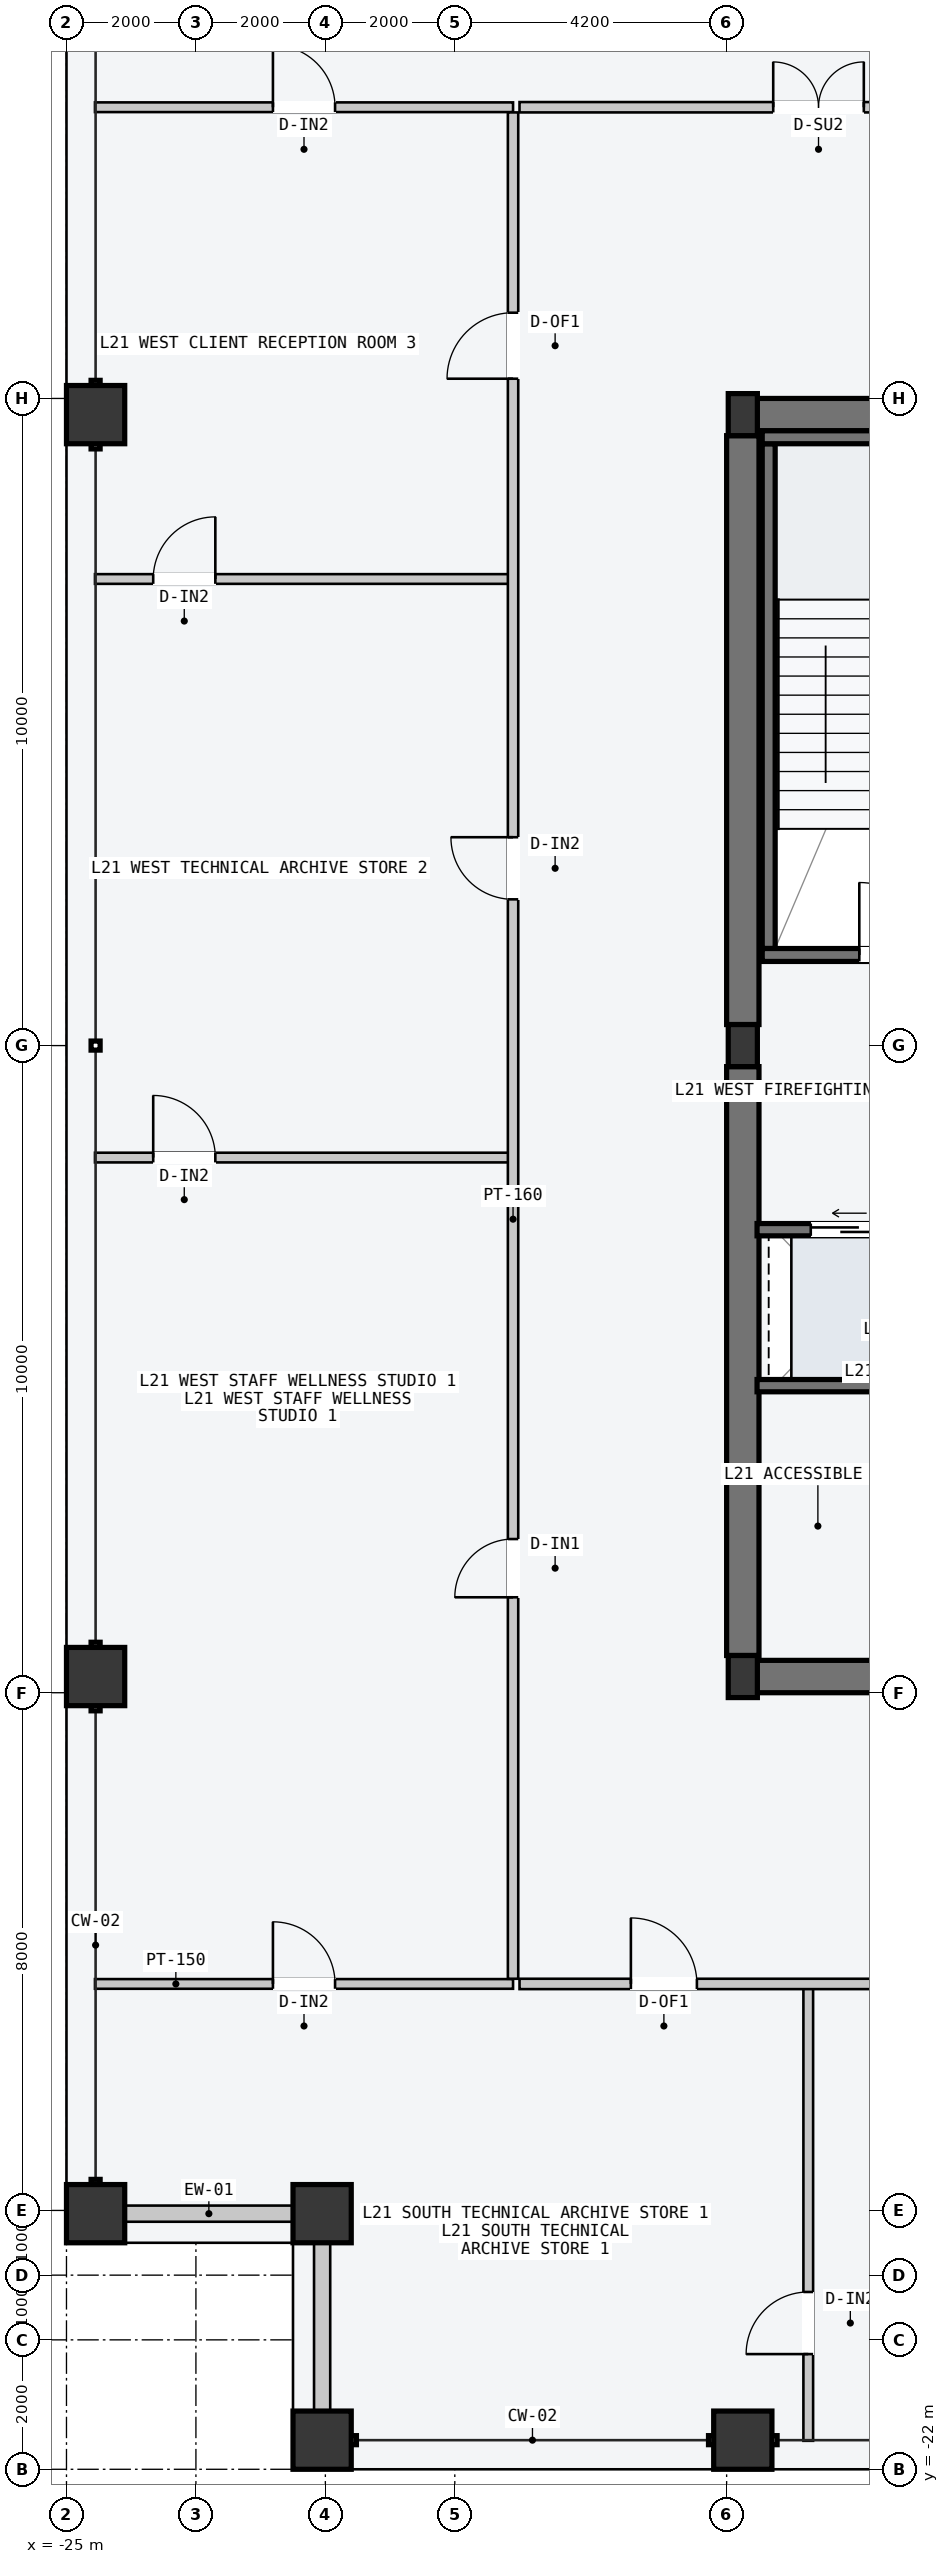
"""IFC4 building model, lengths in metres.
Left out: names, types, materials, properties, quantities, classifications, styles, units other than length and angle.
Written with IfcOpenShell. Run it as: python <this file> out.ifc"""

import sys

from ifc_helpers import new_model, si_unit, direction, frame, frame_2d, origin, origin_2d, place, context, subcontext, project, spatial, rectangle, hollow_rectangle, i_section, extrude, element, fill, save


model = new_model("IFC4")
c1 = context("Model", 3, precision=1e-05, world=origin(), true_north=direction((0.0, 1.0)))
c2 = subcontext(c1, "Body", "Model", "MODEL_VIEW")
j1 = project(units=[si_unit("LENGTHUNIT", "METRE"), si_unit("PLANEANGLEUNIT", "RADIAN")], contexts=[c1])
p1 = place(None, origin())
s1 = spatial("IfcSite", under=j1, at=p1, CompositionType="ELEMENT")
p2 = place(p1, origin())
s2 = spatial("IfcBuilding", under=s1, at=p2, CompositionType="ELEMENT")
p3 = place(p2, frame((0.0, 0.0, 82.8)))
s3 = spatial("IfcBuildingStorey", under=s2, at=p3, CompositionType="ELEMENT", Elevation=82.8)
for number, where, z_axis, x_axis in (
    (1, (-14.53, -9.75, -0.2), (0.0, 0.0, 1.0), (1.0, 0.0, 0.0)),
    (2, (-14.53, 9.75, -0.2), (0.0, 0.0, 1.0), (1.0, 0.0, 0.0)),
):
    element("IfcWall", number, at=place(p3, frame(where, z_axis=z_axis, x_axis=x_axis)), inside=s3, PredefinedType="SHEAR", context=c2, shape_type="SweptSolid", body=[
        extrude(rectangle(XDim=6.46, YDim=0.5, at=frame_2d((3.23, 0.0))), origin(), (0.0, 0.0, 1.0), 4.5),
    ])
for number, where, z_axis, x_axis in (
    (3, (-14.55, -9.425, -0.2), (0.0, 0.0, 1.0), (0.0, 1.0, 0.0)),
    (4, (-14.55, 0.325, -0.2), (0.0, 0.0, 1.0), (0.0, 1.0, 0.0)),
):
    element("IfcWall", number, at=place(p3, frame(where, z_axis=z_axis, x_axis=x_axis)), inside=s3, PredefinedType="SHEAR", context=c2, shape_type="SweptSolid", body=[
        extrude(rectangle(XDim=9.1, YDim=0.5, at=frame_2d((4.55, 0.0))), origin(), (0.0, 0.0, 1.0), 4.5),
    ])
p4 = place(p3, frame((-14.15, 1.5, -0.2), z_axis=(0.0, 0.0, 1.0), x_axis=(0.0, 1.0, 0.0)))
e5 = element("IfcWall", 5, at=p4, inside=s3, PredefinedType="SOLIDWALL", context=c2, shape_type="SweptSolid", body=[
    extrude(rectangle(XDim=7.8, YDim=0.2, at=frame_2d((3.9, 0.0))), origin(), (0.0, 0.0, 1.0), 4.5),
])
p5 = place(p3, frame((-14.25, 1.4, -0.2), z_axis=(0.0, 0.0, 1.0), x_axis=(1.0, 0.0, 0.0)))
e6 = element("IfcWall", 6, at=p5, inside=s3, PredefinedType="SOLIDWALL", context=c2, shape_type="SweptSolid", body=[
    extrude(rectangle(XDim=4.1, YDim=0.2, at=frame_2d((2.05, 0.0))), origin(), (0.0, 0.0, 1.0), 4.5),
])
p6 = place(p5, frame((1.5, 0.0, 0.2)))
e7 = element("IfcOpeningElement", 7, at=p6, cuts=e6, PredefinedType="OPENING", context=c2, shape_type="SweptSolid", body=[
    extrude(rectangle(XDim=1.12, YDim=2.18, at=frame_2d((0.56, 1.09))), frame((0.0, 0.11, 0.0), z_axis=(0.0, -1.0, 0.0), x_axis=(1.0, 0.0, 0.0)), (0.0, 0.0, 1.0), 0.22),
])
p7 = place(p3, frame((-14.25, 9.4, -0.2), z_axis=(0.0, 0.0, 1.0), x_axis=(1.0, 0.0, 0.0)))
e8 = element("IfcWall", 8, at=p7, inside=s3, PredefinedType="SOLIDWALL", context=c2, shape_type="SweptSolid", body=[
    extrude(rectangle(XDim=4.1, YDim=0.2, at=frame_2d((2.05, 0.0))), origin(), (0.0, 0.0, 1.0), 4.5),
])
for number, where, z_axis, x_axis in (
    (9, (-14.55, -9.75, 0.0), (0.0, 0.0, 1.0), (1.0, 0.0, 0.0)),
    (10, (-14.55, 0.0, 0.0), (0.0, 0.0, 1.0), (1.0, 0.0, 0.0)),
    (11, (-14.55, 9.75, 0.0), (0.0, 0.0, 1.0), (1.0, 0.0, 0.0)),
):
    element("IfcColumn", number, at=place(p3, frame(where, z_axis=z_axis, x_axis=x_axis)), inside=s3, PredefinedType="COLUMN", context=c2, shape_type="SweptSolid", body=[
        extrude(i_section(OverallWidth=0.45, OverallDepth=0.65, WebThickness=0.025, FlangeThickness=0.04, at=origin_2d()), origin(), (0.0, 0.0, 1.0), 4.5),
    ])
for number, where, z_axis, x_axis in (
    (12, (-21.05, -21.55, 0.0), (0.0, 0.0, 1.0), (1.0, 0.0, 0.0)),
    (13, (-14.55, -21.55, 0.0), (0.0, 0.0, 1.0), (1.0, 0.0, 0.0)),
    (14, (-24.55, -18.05, 0.0), (0.0, 0.0, 1.0), (0.0, 1.0, 0.0)),
    (15, (-24.55, -9.75, 0.0), (0.0, 0.0, 1.0), (0.0, 1.0, 0.0)),
    (16, (-24.55, 9.75, 0.0), (0.0, 0.0, 1.0), (0.0, 1.0, 0.0)),
    (17, (-21.05, -18.05, 0.0), (0.0, 0.0, 1.0), (1.0, 0.0, 0.0)),
):
    element("IfcColumn", number, at=place(p3, frame(where, z_axis=z_axis, x_axis=x_axis)), inside=s3, PredefinedType="COLUMN", context=c2, shape_type="SweptSolid", body=[
        extrude(hollow_rectangle(XDim=0.9, YDim=0.9, WallThickness=0.045, at=origin_2d()), origin(), (0.0, 0.0, 1.0), 4.5),
    ])
for number, where, z_axis, x_axis in (
    (18, (-24.09, -18.05, 0.0), (0.0, 0.0, 1.0), (1.0, 0.0, 0.0)),
    (19, (-21.05, -21.09, 0.0), (0.0, 0.0, 1.0), (0.0, 1.0, 0.0)),
):
    element("IfcWall", number, at=place(p3, frame(where, z_axis=z_axis, x_axis=x_axis)), inside=s3, PredefinedType="STANDARD", context=c2, shape_type="SweptSolid", body=[
        extrude(rectangle(XDim=2.58, YDim=0.25, at=frame_2d((1.29, 0.0))), origin(), (0.0, 0.0, 1.0), 2.64),
    ])
p8 = place(p3, frame((-14.33, -2.845, -0.2), z_axis=(0.0, 0.0, 1.0), x_axis=(1.0, 0.0, 0.0)))
e20 = element("IfcWall", 20, at=p8, inside=s3, PredefinedType="SOLIDWALL", context=c2, shape_type="SweptSolid", body=[
    extrude(rectangle(XDim=2.68, YDim=0.19, at=frame_2d((1.34, 0.0))), origin(), (0.0, 0.0, 1.0), 4.5),
])
p9 = place(p8, frame((0.83, 0.0, 0.2)))
e21 = element("IfcOpeningElement", 21, at=p9, cuts=e20, PredefinedType="OPENING", context=c2, shape_type="SweptSolid", body=[
    extrude(rectangle(XDim=1.2, YDim=2.2, at=frame_2d((0.6, 1.1))), frame((0.0, 0.105, 0.0), z_axis=(0.0, -1.0, 0.0), x_axis=(1.0, 0.0, 0.0)), (0.0, 0.0, 1.0), 0.21),
])
p10 = place(p3, frame((-14.33, -5.255, -0.2), z_axis=(0.0, 0.0, 1.0), x_axis=(1.0, 0.0, 0.0)))
e22 = element("IfcWall", 22, at=p10, inside=s3, PredefinedType="SOLIDWALL", context=c2, shape_type="SweptSolid", body=[
    extrude(rectangle(XDim=2.68, YDim=0.19, at=frame_2d((1.34, 0.0))), origin(), (0.0, 0.0, 1.0), 4.5),
])
p11 = place(p3, frame((-18.0, 14.5, 0.0), z_axis=(0.0, 0.0, 1.0), x_axis=(1.0, 0.0, 0.0)))
e23 = element("IfcWall", 23, at=p11, inside=s3, PredefinedType="PARTITIONING", context=c2, shape_type="SweptSolid", body=[
    extrude(rectangle(XDim=36.0, YDim=0.16, at=frame_2d((18.0, 0.0))), origin(), (0.0, 0.0, 1.0), 4.3),
])
p12 = place(p11, frame((3.92, 0.0, 0.0)))
e24 = element("IfcOpeningElement", 24, at=p12, cuts=e23, PredefinedType="OPENING", context=c2, shape_type="SweptSolid", body=[
    extrude(rectangle(XDim=1.4, YDim=2.2, at=frame_2d((0.7, 1.1))), frame((0.0, 0.09, 0.0), z_axis=(0.0, -1.0, 0.0), x_axis=(1.0, 0.0, 0.0)), (0.0, 0.0, 1.0), 0.18),
])
p13 = place(p11, frame((17.749, 0.0, 0.0)))
e25 = element("IfcOpeningElement", 25, at=p13, cuts=e23, PredefinedType="OPENING", context=c2, shape_type="SweptSolid", body=[
    extrude(rectangle(XDim=0.9, YDim=2.15, at=frame_2d((0.45, 1.075))), frame((0.0, 0.09, 0.0), z_axis=(0.0, -1.0, 0.0), x_axis=(1.0, 0.0, 0.0)), (0.0, 0.0, 1.0), 0.18),
])
p14 = place(p11, frame((31.099, 0.0, 0.0)))
e26 = element("IfcOpeningElement", 26, at=p14, cuts=e23, PredefinedType="OPENING", context=c2, shape_type="SweptSolid", body=[
    extrude(rectangle(XDim=0.96, YDim=2.18, at=frame_2d((0.48, 1.09))), frame((0.0, 0.09, 0.0), z_axis=(0.0, -1.0, 0.0), x_axis=(1.0, 0.0, 0.0)), (0.0, 0.0, 1.0), 0.18),
])
p15 = place(p3, frame((-24.56, 14.5, 0.0), z_axis=(0.0, 0.0, 1.0), x_axis=(1.0, 0.0, 0.0)))
e27 = element("IfcWall", 27, at=p15, inside=s3, PredefinedType="PARTITIONING", context=c2, shape_type="SweptSolid", body=[
    extrude(rectangle(XDim=6.46, YDim=0.15, at=frame_2d((3.23, 0.0))), origin(), (0.0, 0.0, 1.0), 4.3),
])
p16 = place(p15, frame((2.75, 0.0, 0.0)))
e28 = element("IfcOpeningElement", 28, at=p16, cuts=e27, PredefinedType="OPENING", context=c2, shape_type="SweptSolid", body=[
    extrude(rectangle(XDim=0.96, YDim=2.18, at=frame_2d((0.48, 1.09))), frame((0.0, 0.085, 0.0), z_axis=(0.0, -1.0, 0.0), x_axis=(1.0, 0.0, 0.0)), (0.0, 0.0, 1.0), 0.17),
])
p17 = place(p3, frame((-13.539, -21.56, 0.0), z_axis=(0.0, 0.0, 1.0), x_axis=(0.0, 1.0, 0.0)))
e29 = element("IfcWall", 29, at=p17, inside=s3, PredefinedType="PARTITIONING", context=c2, shape_type="SweptSolid", body=[
    extrude(rectangle(XDim=7.0, YDim=0.15, at=frame_2d((3.5, 0.0))), origin(), (0.0, 0.0, 1.0), 4.3),
])
p18 = place(p17, frame((1.34, 0.0, 0.0)))
e30 = element("IfcOpeningElement", 30, at=p18, cuts=e29, PredefinedType="OPENING", context=c2, shape_type="SweptSolid", body=[
    extrude(rectangle(XDim=0.96, YDim=2.18, at=frame_2d((0.48, 1.09))), frame((0.0, 0.085, 0.0), z_axis=(0.0, -1.0, 0.0), x_axis=(1.0, 0.0, 0.0)), (0.0, 0.0, 1.0), 0.17),
])
p19 = place(p3, frame((-18.0, -14.5, 0.0), z_axis=(0.0, 0.0, 1.0), x_axis=(1.0, 0.0, 0.0)))
e31 = element("IfcWall", 31, at=p19, inside=s3, PredefinedType="PARTITIONING", context=c2, shape_type="SweptSolid", body=[
    extrude(rectangle(XDim=36.0, YDim=0.16, at=frame_2d((18.0, 0.0))), origin(), (0.0, 0.0, 1.0), 4.3),
])
p20 = place(p19, frame((1.721, 0.0, 0.0)))
e32 = element("IfcOpeningElement", 32, at=p20, cuts=e31, PredefinedType="OPENING", context=c2, shape_type="SweptSolid", body=[
    extrude(rectangle(XDim=1.02, YDim=2.2, at=frame_2d((0.51, 1.1))), frame((0.0, 0.09, 0.0), z_axis=(0.0, -1.0, 0.0), x_axis=(1.0, 0.0, 0.0)), (0.0, 0.0, 1.0), 0.18),
])
p21 = place(p19, frame((7.515, 0.0, 0.0)))
e33 = element("IfcOpeningElement", 33, at=p21, cuts=e31, PredefinedType="OPENING", context=c2, shape_type="SweptSolid", body=[
    extrude(rectangle(XDim=1.06, YDim=2.2, at=frame_2d((0.53, 1.1))), frame((0.0, 0.09, 0.0), z_axis=(0.0, -1.0, 0.0), x_axis=(1.0, 0.0, 0.0)), (0.0, 0.0, 1.0), 0.18),
])
p22 = place(p19, frame((14.991, 0.0, 0.0)))
e34 = element("IfcOpeningElement", 34, at=p22, cuts=e31, PredefinedType="OPENING", context=c2, shape_type="SweptSolid", body=[
    extrude(rectangle(XDim=1.24, YDim=2.24, at=frame_2d((0.62, 1.12))), frame((0.0, 0.09, 0.0), z_axis=(0.0, -1.0, 0.0), x_axis=(1.0, 0.0, 0.0)), (0.0, 0.0, 1.0), 0.18),
])
p23 = place(p19, frame((23.273, 0.0, 0.0)))
e35 = element("IfcOpeningElement", 35, at=p23, cuts=e31, PredefinedType="OPENING", context=c2, shape_type="SweptSolid", body=[
    extrude(rectangle(XDim=1.4, YDim=2.2, at=frame_2d((0.7, 1.1))), frame((0.0, 0.09, 0.0), z_axis=(0.0, -1.0, 0.0), x_axis=(1.0, 0.0, 0.0)), (0.0, 0.0, 1.0), 0.18),
])
p24 = place(p19, frame((31.727, 0.0, 0.0)))
e36 = element("IfcOpeningElement", 36, at=p24, cuts=e31, PredefinedType="OPENING", context=c2, shape_type="SweptSolid", body=[
    extrude(rectangle(XDim=0.9, YDim=2.15, at=frame_2d((0.45, 1.075))), frame((0.0, 0.09, 0.0), z_axis=(0.0, -1.0, 0.0), x_axis=(1.0, 0.0, 0.0)), (0.0, 0.0, 1.0), 0.18),
])
p25 = place(p3, frame((-24.56, -14.5, 0.0), z_axis=(0.0, 0.0, 1.0), x_axis=(1.0, 0.0, 0.0)))
e37 = element("IfcWall", 37, at=p25, inside=s3, PredefinedType="PARTITIONING", context=c2, shape_type="SweptSolid", body=[
    extrude(rectangle(XDim=6.46, YDim=0.15, at=frame_2d((3.23, 0.0))), origin(), (0.0, 0.0, 1.0), 4.3),
])
p26 = place(p25, frame((2.75, 0.0, 0.0)))
e38 = element("IfcOpeningElement", 38, at=p26, cuts=e37, PredefinedType="OPENING", context=c2, shape_type="SweptSolid", body=[
    extrude(rectangle(XDim=0.96, YDim=2.18, at=frame_2d((0.48, 1.09))), frame((0.0, 0.085, 0.0), z_axis=(0.0, -1.0, 0.0), x_axis=(1.0, 0.0, 0.0)), (0.0, 0.0, 1.0), 0.17),
])
p27 = place(p3, frame((-24.56, -1.73, 0.0), z_axis=(0.0, 0.0, 1.0), x_axis=(1.0, 0.0, 0.0)))
e39 = element("IfcWall", 39, at=p27, inside=s3, PredefinedType="PARTITIONING", context=c2, shape_type="SweptSolid", body=[
    extrude(rectangle(XDim=6.4, YDim=0.15, at=frame_2d((3.2, 0.0))), origin(), (0.0, 0.0, 1.0), 4.3),
])
p28 = place(p27, frame((0.9, 0.0, 0.0)))
e40 = element("IfcOpeningElement", 40, at=p28, cuts=e39, PredefinedType="OPENING", context=c2, shape_type="SweptSolid", body=[
    extrude(rectangle(XDim=0.96, YDim=2.18, at=frame_2d((0.48, 1.09))), frame((0.0, 0.085, 0.0), z_axis=(0.0, -1.0, 0.0), x_axis=(1.0, 0.0, 0.0)), (0.0, 0.0, 1.0), 0.17),
])
p29 = place(p3, frame((-24.56, 7.21, 0.0), z_axis=(0.0, 0.0, 1.0), x_axis=(1.0, 0.0, 0.0)))
e41 = element("IfcWall", 41, at=p29, inside=s3, PredefinedType="PARTITIONING", context=c2, shape_type="SweptSolid", body=[
    extrude(rectangle(XDim=6.4, YDim=0.15, at=frame_2d((3.2, 0.0))), origin(), (0.0, 0.0, 1.0), 4.3),
])
p30 = place(p29, frame((0.9, 0.0, 0.0)))
e42 = element("IfcOpeningElement", 42, at=p30, cuts=e41, PredefinedType="OPENING", context=c2, shape_type="SweptSolid", body=[
    extrude(rectangle(XDim=0.96, YDim=2.18, at=frame_2d((0.48, 1.09))), frame((0.0, 0.085, 0.0), z_axis=(0.0, -1.0, 0.0), x_axis=(1.0, 0.0, 0.0)), (0.0, 0.0, 1.0), 0.17),
])
p31 = place(p3, frame((-18.1, -14.42, 0.0), z_axis=(0.0, 0.0, 1.0), x_axis=(0.0, 1.0, 0.0)))
e43 = element("IfcWall", 43, at=p31, inside=s3, PredefinedType="PARTITIONING", context=c2, shape_type="SweptSolid", body=[
    extrude(rectangle(XDim=28.84, YDim=0.16, at=frame_2d((14.42, 0.0))), origin(), (0.0, 0.0, 1.0), 2.64),
])
p32 = place(p31, frame((5.895, 0.0, 0.0)))
e44 = element("IfcOpeningElement", 44, at=p32, cuts=e43, PredefinedType="OPENING", context=c2, shape_type="SweptSolid", body=[
    extrude(rectangle(XDim=0.9, YDim=2.15, at=frame_2d((0.45, 1.075))), frame((0.0, 0.09, 0.0), z_axis=(0.0, -1.0, 0.0), x_axis=(1.0, 0.0, 0.0)), (0.0, 0.0, 1.0), 0.18),
])
p33 = place(p31, frame((16.68, 0.0, 0.0)))
e45 = element("IfcOpeningElement", 45, at=p33, cuts=e43, PredefinedType="OPENING", context=c2, shape_type="SweptSolid", body=[
    extrude(rectangle(XDim=0.96, YDim=2.18, at=frame_2d((0.48, 1.09))), frame((0.0, 0.09, 0.0), z_axis=(0.0, -1.0, 0.0), x_axis=(1.0, 0.0, 0.0)), (0.0, 0.0, 1.0), 0.18),
])
p34 = place(p31, frame((24.725, 0.0, 0.0)))
e46 = element("IfcOpeningElement", 46, at=p34, cuts=e43, PredefinedType="OPENING", context=c2, shape_type="SweptSolid", body=[
    extrude(rectangle(XDim=1.02, YDim=2.2, at=frame_2d((0.51, 1.1))), frame((0.0, 0.09, 0.0), z_axis=(0.0, -1.0, 0.0), x_axis=(1.0, 0.0, 0.0)), (0.0, 0.0, 1.0), 0.18),
])
p35 = place(p6, origin())
e47 = element("IfcDoor", 47, at=p35, inside=s3, OperationType="SINGLE_SWING_LEFT", PredefinedType="DOOR", context=c2, shape_type="SweptSolid", body=[
    extrude(rectangle(XDim=1.12, YDim=2.18, at=frame_2d((0.56, 1.09))), frame((0.0, 0.025, 0.0), z_axis=(0.0, -1.0, 0.0), x_axis=(1.0, 0.0, 0.0)), (0.0, 0.0, 1.0), 0.05),
])
fill(e7, e47)
p36 = place(p9, origin())
e48 = element("IfcDoor", 48, at=p36, inside=s3, OperationType="SLIDING_TO_LEFT", PredefinedType="DOOR", context=c2, shape_type="SweptSolid", body=[
    extrude(rectangle(XDim=1.2, YDim=2.2, at=frame_2d((0.6, 1.1))), frame((0.0, 0.025, 0.0), z_axis=(0.0, -1.0, 0.0), x_axis=(1.0, 0.0, 0.0)), (0.0, 0.0, 1.0), 0.05),
])
fill(e21, e48)
p37 = place(p12, origin())
e49 = element("IfcDoor", 49, at=p37, inside=s3, OperationType="DOUBLE_DOOR_SINGLE_SWING", PredefinedType="DOOR", context=c2, shape_type="SweptSolid", body=[
    extrude(rectangle(XDim=1.4, YDim=2.2, at=frame_2d((0.7, 1.1))), frame((0.0, 0.025, 0.0), z_axis=(0.0, -1.0, 0.0), x_axis=(1.0, 0.0, 0.0)), (0.0, 0.0, 1.0), 0.05),
])
fill(e24, e49)
p38 = place(p16, origin())
e50 = element("IfcDoor", 50, at=p38, inside=s3, OperationType="SINGLE_SWING_LEFT", PredefinedType="DOOR", context=c2, shape_type="SweptSolid", body=[
    extrude(rectangle(XDim=0.96, YDim=2.18, at=frame_2d((0.48, 1.09))), frame((0.0, 0.025, 0.0), z_axis=(0.0, -1.0, 0.0), x_axis=(1.0, 0.0, 0.0)), (0.0, 0.0, 1.0), 0.05),
])
fill(e28, e50)
p39 = place(p18, origin())
e51 = element("IfcDoor", 51, at=p39, inside=s3, OperationType="SINGLE_SWING_LEFT", PredefinedType="DOOR", context=c2, shape_type="SweptSolid", body=[
    extrude(rectangle(XDim=0.96, YDim=2.18, at=frame_2d((0.48, 1.09))), frame((0.0, 0.025, 0.0), z_axis=(0.0, -1.0, 0.0), x_axis=(1.0, 0.0, 0.0)), (0.0, 0.0, 1.0), 0.05),
])
fill(e30, e51)
p40 = place(p20, origin())
e52 = element("IfcDoor", 52, at=p40, inside=s3, OperationType="SINGLE_SWING_LEFT", PredefinedType="DOOR", context=c2, shape_type="SweptSolid", body=[
    extrude(rectangle(XDim=1.02, YDim=2.2, at=frame_2d((0.51, 1.1))), frame((0.0, 0.025, 0.0), z_axis=(0.0, -1.0, 0.0), x_axis=(1.0, 0.0, 0.0)), (0.0, 0.0, 1.0), 0.05),
])
fill(e32, e52)
p41 = place(p26, origin())
e53 = element("IfcDoor", 53, at=p41, inside=s3, OperationType="SINGLE_SWING_LEFT", PredefinedType="DOOR", context=c2, shape_type="SweptSolid", body=[
    extrude(rectangle(XDim=0.96, YDim=2.18, at=frame_2d((0.48, 1.09))), frame((0.0, 0.025, 0.0), z_axis=(0.0, -1.0, 0.0), x_axis=(1.0, 0.0, 0.0)), (0.0, 0.0, 1.0), 0.05),
])
fill(e38, e53)
p42 = place(p28, origin())
e54 = element("IfcDoor", 54, at=p42, inside=s3, OperationType="SINGLE_SWING_LEFT", PredefinedType="DOOR", context=c2, shape_type="SweptSolid", body=[
    extrude(rectangle(XDim=0.96, YDim=2.18, at=frame_2d((0.48, 1.09))), frame((0.0, 0.025, 0.0), z_axis=(0.0, -1.0, 0.0), x_axis=(1.0, 0.0, 0.0)), (0.0, 0.0, 1.0), 0.05),
])
fill(e40, e54)
p43 = place(p30, origin())
e55 = element("IfcDoor", 55, at=p43, inside=s3, OperationType="SINGLE_SWING_RIGHT", PredefinedType="DOOR", context=c2, shape_type="SweptSolid", body=[
    extrude(rectangle(XDim=0.96, YDim=2.18, at=frame_2d((0.48, 1.09))), frame((0.0, 0.025, 0.0), z_axis=(0.0, -1.0, 0.0), x_axis=(1.0, 0.0, 0.0)), (0.0, 0.0, 1.0), 0.05),
])
fill(e42, e55)
p44 = place(p32, origin())
e56 = element("IfcDoor", 56, at=p44, inside=s3, OperationType="SINGLE_SWING_LEFT", PredefinedType="DOOR", context=c2, shape_type="SweptSolid", body=[
    extrude(rectangle(XDim=0.9, YDim=2.15, at=frame_2d((0.45, 1.075))), frame((0.0, 0.025, 0.0), z_axis=(0.0, -1.0, 0.0), x_axis=(1.0, 0.0, 0.0)), (0.0, 0.0, 1.0), 0.05),
])
fill(e44, e56)
p45 = place(p33, origin())
e57 = element("IfcDoor", 57, at=p45, inside=s3, OperationType="SINGLE_SWING_RIGHT", PredefinedType="DOOR", context=c2, shape_type="SweptSolid", body=[
    extrude(rectangle(XDim=0.96, YDim=2.18, at=frame_2d((0.48, 1.09))), frame((0.0, 0.025, 0.0), z_axis=(0.0, -1.0, 0.0), x_axis=(1.0, 0.0, 0.0)), (0.0, 0.0, 1.0), 0.05),
])
fill(e45, e57)
p46 = place(p34, origin())
e58 = element("IfcDoor", 58, at=p46, inside=s3, OperationType="SINGLE_SWING_LEFT", PredefinedType="DOOR", context=c2, shape_type="SweptSolid", body=[
    extrude(rectangle(XDim=1.02, YDim=2.2, at=frame_2d((0.51, 1.1))), frame((0.0, 0.025, 0.0), z_axis=(0.0, -1.0, 0.0), x_axis=(1.0, 0.0, 0.0)), (0.0, 0.0, 1.0), 0.05),
])
fill(e46, e58)
save(model, sys.argv[1])
